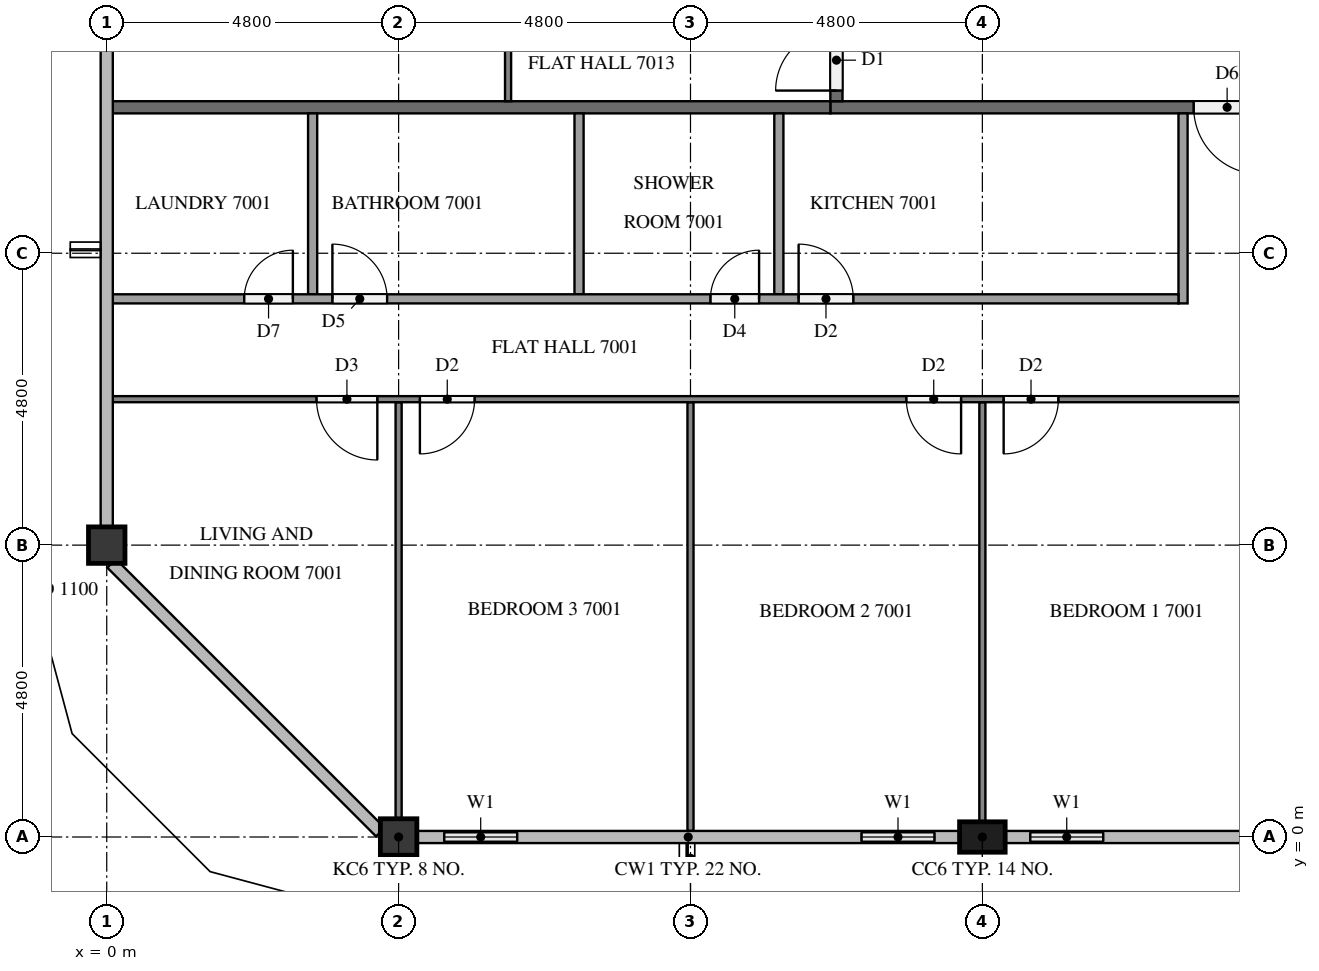
"""IFC4 building model, lengths in metres.
Left out: names, types, materials, properties, quantities, classifications, styles, units other than length and angle.
Written with IfcOpenShell. Run it as: python <this file> out.ifc"""

import sys

from ifc_helpers import new_model, si_unit, direction, frame, frame_2d, origin, origin_2d, place, context, subcontext, project, spatial, rectangle, extrude, element, fill, save


model = new_model("IFC4")
c1 = context("Model", 3, precision=1e-05, world=origin(), true_north=direction((0.0, 1.0)))
c2 = subcontext(c1, "Body", "Model", "MODEL_VIEW")
j1 = project(units=[si_unit("LENGTHUNIT", "METRE"), si_unit("PLANEANGLEUNIT", "RADIAN")], contexts=[c1])
p1 = place(None, origin())
s1 = spatial("IfcSite", under=j1, at=p1, CompositionType="ELEMENT")
p2 = place(p1, origin())
s2 = spatial("IfcBuilding", under=s1, at=p2, CompositionType="ELEMENT")
p3 = place(p2, frame((0.0, 0.0, 268.6)))
s3 = spatial("IfcBuildingStorey", under=s2, at=p3, CompositionType="ELEMENT", Elevation=268.6)
p4 = place(p3, frame((4.8, 0.0, 0.0), z_axis=(0.0, 0.0, 1.0), x_axis=(1.0, 0.0, 0.0)))
e1 = element("IfcColumn", 1, at=p4, inside=s3, PredefinedType="COLUMN", context=c2, shape_type="SweptSolid", body=[
    extrude(rectangle(XDim=0.6, YDim=0.6, at=origin_2d()), origin(), (0.0, 0.0, 1.0), 3.2),
])
p5 = place(p3, frame((14.4, 0.0, 0.0), z_axis=(0.0, 0.0, 1.0), x_axis=(1.0, 0.0, 0.0)))
e2 = element("IfcColumn", 2, at=p5, inside=s3, PredefinedType="COLUMN", context=c2, shape_type="SweptSolid", body=[
    extrude(rectangle(XDim=0.75, YDim=0.5, at=origin_2d()), origin(), (0.0, 0.0, 1.0), 3.2),
])
p6 = place(p3, frame((0.0, 4.8, 0.0), z_axis=(0.0, 0.0, 1.0), x_axis=(1.0, 0.0, 0.0)))
e3 = element("IfcColumn", 3, at=p6, inside=s3, PredefinedType="COLUMN", context=c2, shape_type="SweptSolid", body=[
    extrude(rectangle(XDim=0.6, YDim=0.6, at=origin_2d()), origin(), (0.0, 0.0, 1.0), 3.2),
])
p7 = place(p3, frame((5.1, 0.0, 0.0), z_axis=(0.0, 0.0, 1.0), x_axis=(1.0, 0.0, 0.0)))
e4 = element("IfcWall", 4, at=p7, inside=s3, PredefinedType="SOLIDWALL", context=c2, shape_type="SweptSolid", body=[
    extrude(rectangle(XDim=2.1, YDim=0.15, at=frame_2d((1.05, 0.0))), origin(), (0.0, 0.0, 1.0), 3.2),
])
p8 = place(p7, frame((0.45, 0.0, 0.9)))
e5 = element("IfcOpeningElement", 5, at=p8, cuts=e4, PredefinedType="OPENING", context=c2, shape_type="SweptSolid", body=[
    extrude(rectangle(XDim=1.2, YDim=1.4, at=frame_2d((0.6, 0.7))), frame((0.0, 0.085, 0.0), z_axis=(0.0, -1.0, 0.0), x_axis=(1.0, 0.0, 0.0)), (0.0, 0.0, 1.0), 0.17),
])
p9 = place(p3, frame((12.0, 0.0, 0.0), z_axis=(0.0, 0.0, 1.0), x_axis=(1.0, 0.0, 0.0)))
e6 = element("IfcWall", 6, at=p9, inside=s3, PredefinedType="SOLIDWALL", context=c2, shape_type="SweptSolid", body=[
    extrude(rectangle(XDim=2.025, YDim=0.15, at=frame_2d((1.012, 0.0))), origin(), (0.0, 0.0, 1.0), 3.2),
])
p10 = place(p9, frame((0.413, 0.0, 0.9)))
e7 = element("IfcOpeningElement", 7, at=p10, cuts=e6, PredefinedType="OPENING", context=c2, shape_type="SweptSolid", body=[
    extrude(rectangle(XDim=1.2, YDim=1.4, at=frame_2d((0.6, 0.7))), frame((0.0, 0.085, 0.0), z_axis=(0.0, -1.0, 0.0), x_axis=(1.0, 0.0, 0.0)), (0.0, 0.0, 1.0), 0.17),
])
p11 = place(p3, frame((14.775, 0.0, 0.0), z_axis=(0.0, 0.0, 1.0), x_axis=(1.0, 0.0, 0.0)))
e8 = element("IfcWall", 8, at=p11, inside=s3, PredefinedType="SOLIDWALL", context=c2, shape_type="SweptSolid", body=[
    extrude(rectangle(XDim=2.025, YDim=0.15, at=frame_2d((1.013, 0.0))), origin(), (0.0, 0.0, 1.0), 3.2),
])
p12 = place(p11, frame((0.413, 0.0, 0.9)))
e9 = element("IfcOpeningElement", 9, at=p12, cuts=e8, PredefinedType="OPENING", context=c2, shape_type="SweptSolid", body=[
    extrude(rectangle(XDim=1.2, YDim=1.4, at=frame_2d((0.6, 0.7))), frame((0.0, 0.085, 0.0), z_axis=(0.0, -1.0, 0.0), x_axis=(1.0, 0.0, 0.0)), (0.0, 0.0, 1.0), 0.17),
])
p13 = place(p3, frame((50.5, 12.0, 0.0), z_axis=(0.0, 0.0, 1.0), x_axis=(-1.0, 0.0, 0.0)))
e10 = element("IfcWall", 10, at=p13, inside=s3, PredefinedType="PARTITIONING", context=c2, shape_type="SweptSolid", body=[
    extrude(rectangle(XDim=38.6, YDim=0.2, at=frame_2d((19.3, 0.0))), origin(), (0.0, 0.0, 1.0), 3.2),
])
p14 = place(p13, frame((31.525, 0.0, 0.0)))
e11 = element("IfcOpeningElement", 11, at=p14, cuts=e10, PredefinedType="OPENING", context=c2, shape_type="SweptSolid", body=[
    extrude(rectangle(XDim=1.1, YDim=2.1, at=frame_2d((0.55, 1.05))), frame((0.0, 0.11, 0.0), z_axis=(0.0, -1.0, 0.0), x_axis=(1.0, 0.0, 0.0)), (0.0, 0.0, 1.0), 0.22),
])
p15 = place(p13, frame((19.575, 0.0, 0.0)))
e12 = element("IfcOpeningElement", 12, at=p15, cuts=e10, PredefinedType="OPENING", context=c2, shape_type="SweptSolid", body=[
    extrude(rectangle(XDim=1.0, YDim=2.1, at=frame_2d((0.5, 1.05))), frame((0.0, 0.11, 0.0), z_axis=(0.0, -1.0, 0.0), x_axis=(1.0, 0.0, 0.0)), (0.0, 0.0, 1.0), 0.22),
])
p16 = place(p13, frame((18.025, 0.0, 0.0)))
e13 = element("IfcOpeningElement", 13, at=p16, cuts=e10, PredefinedType="OPENING", context=c2, shape_type="SweptSolid", body=[
    extrude(rectangle(XDim=1.0, YDim=2.1, at=frame_2d((0.5, 1.05))), frame((0.0, 0.11, 0.0), z_axis=(0.0, -1.0, 0.0), x_axis=(1.0, 0.0, 0.0)), (0.0, 0.0, 1.0), 0.22),
])
p17 = place(p13, frame((1.225, 0.0, 0.0)))
e14 = element("IfcOpeningElement", 14, at=p17, cuts=e10, PredefinedType="OPENING", context=c2, shape_type="SweptSolid", body=[
    extrude(rectangle(XDim=1.0, YDim=2.1, at=frame_2d((0.5, 1.05))), frame((0.0, 0.11, 0.0), z_axis=(0.0, -1.0, 0.0), x_axis=(1.0, 0.0, 0.0)), (0.0, 0.0, 1.0), 0.22),
])
p18 = place(p3, frame((12.0, 12.1, 0.0), z_axis=(0.0, 0.0, 1.0), x_axis=(0.0, 1.0, 0.0)))
e15 = element("IfcWall", 15, at=p18, inside=s3, PredefinedType="PARTITIONING", context=c2, shape_type="SweptSolid", body=[
    extrude(rectangle(XDim=28.6, YDim=0.2, at=frame_2d((14.3, 0.0))), origin(), (0.0, 0.0, 1.0), 3.2),
])
p19 = place(p18, frame((24.175, 0.0, 0.0)))
e16 = element("IfcOpeningElement", 16, at=p19, cuts=e15, PredefinedType="OPENING", context=c2, shape_type="SweptSolid", body=[
    extrude(rectangle(XDim=1.0, YDim=2.1, at=frame_2d((0.5, 1.05))), frame((0.0, 0.11, 0.0), z_axis=(0.0, -1.0, 0.0), x_axis=(1.0, 0.0, 0.0)), (0.0, 0.0, 1.0), 0.22),
])
p20 = place(p18, frame((14.575, 0.0, 0.0)))
e17 = element("IfcOpeningElement", 17, at=p20, cuts=e15, PredefinedType="OPENING", context=c2, shape_type="SweptSolid", body=[
    extrude(rectangle(XDim=1.0, YDim=2.1, at=frame_2d((0.5, 1.05))), frame((0.0, 0.11, 0.0), z_axis=(0.0, -1.0, 0.0), x_axis=(1.0, 0.0, 0.0)), (0.0, 0.0, 1.0), 0.22),
])
p21 = place(p18, frame((0.175, 0.0, 0.0)))
e18 = element("IfcOpeningElement", 18, at=p21, cuts=e15, PredefinedType="OPENING", context=c2, shape_type="SweptSolid", body=[
    extrude(rectangle(XDim=1.0, YDim=2.1, at=frame_2d((0.5, 1.05))), frame((0.0, 0.11, 0.0), z_axis=(0.0, -1.0, 0.0), x_axis=(1.0, 0.0, 0.0)), (0.0, 0.0, 1.0), 0.22),
])
p22 = place(p3, frame((0.1, 12.0, 0.0), z_axis=(0.0, 0.0, 1.0), x_axis=(1.0, 0.0, 0.0)))
e19 = element("IfcWall", 19, at=p22, inside=s3, PredefinedType="PARTITIONING", context=c2, shape_type="SweptSolid", body=[
    extrude(rectangle(XDim=11.8, YDim=0.2, at=frame_2d((5.9, 0.0))), origin(), (0.0, 0.0, 1.0), 3.2),
])
p23 = place(p3, frame((14.4, 7.15, 0.0), z_axis=(0.0, 0.0, 1.0), x_axis=(0.0, -1.0, 0.0)))
e20 = element("IfcWall", 20, at=p23, inside=s3, PredefinedType="PARTITIONING", context=c2, shape_type="SweptSolid", body=[
    extrude(rectangle(XDim=6.9, YDim=0.1, at=frame_2d((3.45, 0.0))), origin(), (0.0, 0.0, 1.0), 3.2),
])
p24 = place(p3, frame((9.6, 7.15, 0.0), z_axis=(0.0, 0.0, 1.0), x_axis=(0.0, -1.0, 0.0)))
e21 = element("IfcWall", 21, at=p24, inside=s3, PredefinedType="PARTITIONING", context=c2, shape_type="SweptSolid", body=[
    extrude(rectangle(XDim=7.05, YDim=0.1, at=frame_2d((3.525, 0.0))), origin(), (0.0, 0.0, 1.0), 3.2),
])
p25 = place(p3, frame((4.8, 7.15, 0.0), z_axis=(0.0, 0.0, 1.0), x_axis=(0.0, -1.0, 0.0)))
e22 = element("IfcWall", 22, at=p25, inside=s3, PredefinedType="PARTITIONING", context=c2, shape_type="SweptSolid", body=[
    extrude(rectangle(XDim=6.85, YDim=0.1, at=frame_2d((3.425, 0.0))), origin(), (0.0, 0.0, 1.0), 3.2),
])
p26 = place(p3, frame((19.1, 7.2, 0.0), z_axis=(0.0, 0.0, 1.0), x_axis=(-1.0, 0.0, 0.0)))
e23 = element("IfcWall", 23, at=p26, inside=s3, PredefinedType="PARTITIONING", context=c2, shape_type="SweptSolid", body=[
    extrude(rectangle(XDim=19.0, YDim=0.1, at=frame_2d((9.5, 0.0))), origin(), (0.0, 0.0, 1.0), 3.2),
])
p27 = place(p26, frame((3.45, 0.0, 0.0)))
e24 = element("IfcOpeningElement", 24, at=p27, cuts=e23, PredefinedType="OPENING", context=c2, shape_type="SweptSolid", body=[
    extrude(rectangle(XDim=0.9, YDim=2.1, at=frame_2d((0.45, 1.05))), frame((0.0, 0.06, 0.0), z_axis=(0.0, -1.0, 0.0), x_axis=(1.0, 0.0, 0.0)), (0.0, 0.0, 1.0), 0.12),
])
p28 = place(p26, frame((5.05, 0.0, 0.0)))
e25 = element("IfcOpeningElement", 25, at=p28, cuts=e23, PredefinedType="OPENING", context=c2, shape_type="SweptSolid", body=[
    extrude(rectangle(XDim=0.9, YDim=2.1, at=frame_2d((0.45, 1.05))), frame((0.0, 0.06, 0.0), z_axis=(0.0, -1.0, 0.0), x_axis=(1.0, 0.0, 0.0)), (0.0, 0.0, 1.0), 0.12),
])
p29 = place(p26, frame((13.05, 0.0, 0.0)))
e26 = element("IfcOpeningElement", 26, at=p29, cuts=e23, PredefinedType="OPENING", context=c2, shape_type="SweptSolid", body=[
    extrude(rectangle(XDim=0.9, YDim=2.1, at=frame_2d((0.45, 1.05))), frame((0.0, 0.06, 0.0), z_axis=(0.0, -1.0, 0.0), x_axis=(1.0, 0.0, 0.0)), (0.0, 0.0, 1.0), 0.12),
])
p30 = place(p26, frame((14.65, 0.0, 0.0)))
e27 = element("IfcOpeningElement", 27, at=p30, cuts=e23, PredefinedType="OPENING", context=c2, shape_type="SweptSolid", body=[
    extrude(rectangle(XDim=1.0, YDim=2.1, at=frame_2d((0.5, 1.05))), frame((0.0, 0.06, 0.0), z_axis=(0.0, -1.0, 0.0), x_axis=(1.0, 0.0, 0.0)), (0.0, 0.0, 1.0), 0.12),
])
for number, where, z_axis, x_axis in (
    (28, (11.053, 11.9, 0.0), (0.0, 0.0, 1.0), (0.0, -1.0, 0.0)),
    (29, (7.767, 11.9, 0.0), (0.0, 0.0, 1.0), (0.0, -1.0, 0.0)),
    (30, (3.386, 11.9, 0.0), (0.0, 0.0, 1.0), (0.0, -1.0, 0.0)),
):
    element("IfcWall", number, at=place(p3, frame(where, z_axis=z_axis, x_axis=x_axis)), inside=s3, PredefinedType="PARTITIONING", context=c2, shape_type="SweptSolid", body=[
        extrude(rectangle(XDim=2.975, YDim=0.15, at=frame_2d((1.487, 0.0))), origin(), (0.0, 0.0, 1.0), 3.2),
    ])
p31 = place(p3, frame((17.7, 11.9, 0.0), z_axis=(0.0, 0.0, 1.0), x_axis=(0.0, -1.0, 0.0)))
e31 = element("IfcWall", 31, at=p31, inside=s3, PredefinedType="PARTITIONING", context=c2, shape_type="SweptSolid", body=[
    extrude(rectangle(XDim=3.125, YDim=0.15, at=frame_2d((1.562, 0.0))), origin(), (0.0, 0.0, 1.0), 3.2),
])
p32 = place(p3, frame((0.1, 8.85, 0.0), z_axis=(0.0, 0.0, 1.0), x_axis=(1.0, 0.0, 0.0)))
e32 = element("IfcWall", 32, at=p32, inside=s3, PredefinedType="PARTITIONING", context=c2, shape_type="SweptSolid", body=[
    extrude(rectangle(XDim=17.525, YDim=0.15, at=frame_2d((8.762, 0.0))), origin(), (0.0, 0.0, 1.0), 3.2),
])
p33 = place(p32, frame((11.278, 0.0, 0.0)))
e33 = element("IfcOpeningElement", 33, at=p33, cuts=e32, PredefinedType="OPENING", context=c2, shape_type="SweptSolid", body=[
    extrude(rectangle(XDim=0.9, YDim=2.1, at=frame_2d((0.45, 1.05))), frame((0.0, 0.085, 0.0), z_axis=(0.0, -1.0, 0.0), x_axis=(1.0, 0.0, 0.0)), (0.0, 0.0, 1.0), 0.17),
])
p34 = place(p32, frame((9.828, 0.0, 0.0)))
e34 = element("IfcOpeningElement", 34, at=p34, cuts=e32, PredefinedType="OPENING", context=c2, shape_type="SweptSolid", body=[
    extrude(rectangle(XDim=0.8, YDim=2.1, at=frame_2d((0.4, 1.05))), frame((0.0, 0.085, 0.0), z_axis=(0.0, -1.0, 0.0), x_axis=(1.0, 0.0, 0.0)), (0.0, 0.0, 1.0), 0.17),
])
p35 = place(p32, frame((3.611, 0.0, 0.0)))
e35 = element("IfcOpeningElement", 35, at=p35, cuts=e32, PredefinedType="OPENING", context=c2, shape_type="SweptSolid", body=[
    extrude(rectangle(XDim=0.9, YDim=2.1, at=frame_2d((0.45, 1.05))), frame((0.0, 0.085, 0.0), z_axis=(0.0, -1.0, 0.0), x_axis=(1.0, 0.0, 0.0)), (0.0, 0.0, 1.0), 0.17),
])
p36 = place(p32, frame((2.161, 0.0, 0.0)))
e36 = element("IfcOpeningElement", 36, at=p36, cuts=e32, PredefinedType="OPENING", context=c2, shape_type="SweptSolid", body=[
    extrude(rectangle(XDim=0.8, YDim=2.1, at=frame_2d((0.4, 1.05))), frame((0.0, 0.085, 0.0), z_axis=(0.0, -1.0, 0.0), x_axis=(1.0, 0.0, 0.0)), (0.0, 0.0, 1.0), 0.17),
])
p37 = place(p3, frame((6.6, 12.1, 0.0), z_axis=(0.0, 0.0, 1.0), x_axis=(0.0, 1.0, 0.0)))
e37 = element("IfcWall", 37, at=p37, inside=s3, PredefinedType="PARTITIONING", context=c2, shape_type="SweptSolid", body=[
    extrude(rectangle(XDim=14.2, YDim=0.1, at=frame_2d((7.1, 0.0))), origin(), (0.0, 0.0, 1.0), 3.2),
])
p38 = place(p37, frame((3.35, 0.0, 0.0)))
e38 = element("IfcOpeningElement", 38, at=p38, cuts=e37, PredefinedType="OPENING", context=c2, shape_type="SweptSolid", body=[
    extrude(rectangle(XDim=1.0, YDim=2.1, at=frame_2d((0.5, 1.05))), frame((0.0, 0.06, 0.0), z_axis=(0.0, -1.0, 0.0), x_axis=(1.0, 0.0, 0.0)), (0.0, 0.0, 1.0), 0.12),
])
p39 = place(p37, frame((5.05, 0.0, 0.0)))
e39 = element("IfcOpeningElement", 39, at=p39, cuts=e37, PredefinedType="OPENING", context=c2, shape_type="SweptSolid", body=[
    extrude(rectangle(XDim=0.9, YDim=2.1, at=frame_2d((0.45, 1.05))), frame((0.0, 0.06, 0.0), z_axis=(0.0, -1.0, 0.0), x_axis=(1.0, 0.0, 0.0)), (0.0, 0.0, 1.0), 0.12),
])
p40 = place(p37, frame((13.0, 0.0, 0.0)))
e40 = element("IfcOpeningElement", 40, at=p40, cuts=e37, PredefinedType="OPENING", context=c2, shape_type="SweptSolid", body=[
    extrude(rectangle(XDim=0.9, YDim=2.1, at=frame_2d((0.45, 1.05))), frame((0.0, 0.06, 0.0), z_axis=(0.0, -1.0, 0.0), x_axis=(1.0, 0.0, 0.0)), (0.0, 0.0, 1.0), 0.12),
])
p41 = place(p8, origin())
e41 = element("IfcWindow", 41, at=p41, inside=s3, PartitioningType="SINGLE_PANEL", PredefinedType="WINDOW", context=c2, shape_type="SweptSolid", body=[
    extrude(rectangle(XDim=1.2, YDim=1.4, at=frame_2d((0.6, 0.7))), frame((0.0, 0.03, 0.0), z_axis=(0.0, -1.0, 0.0), x_axis=(1.0, 0.0, 0.0)), (0.0, 0.0, 1.0), 0.06),
])
fill(e5, e41)
p42 = place(p10, origin())
e42 = element("IfcWindow", 42, at=p42, inside=s3, PartitioningType="SINGLE_PANEL", PredefinedType="WINDOW", context=c2, shape_type="SweptSolid", body=[
    extrude(rectangle(XDim=1.2, YDim=1.4, at=frame_2d((0.6, 0.7))), frame((0.0, 0.03, 0.0), z_axis=(0.0, -1.0, 0.0), x_axis=(1.0, 0.0, 0.0)), (0.0, 0.0, 1.0), 0.06),
])
fill(e7, e42)
p43 = place(p12, origin())
e43 = element("IfcWindow", 43, at=p43, inside=s3, PartitioningType="SINGLE_PANEL", PredefinedType="WINDOW", context=c2, shape_type="SweptSolid", body=[
    extrude(rectangle(XDim=1.2, YDim=1.4, at=frame_2d((0.6, 0.7))), frame((0.0, 0.03, 0.0), z_axis=(0.0, -1.0, 0.0), x_axis=(1.0, 0.0, 0.0)), (0.0, 0.0, 1.0), 0.06),
])
fill(e9, e43)
p44 = place(p14, origin())
e44 = element("IfcDoor", 44, at=p44, inside=s3, OperationType="SINGLE_SWING_LEFT", PredefinedType="DOOR", context=c2, shape_type="SweptSolid", body=[
    extrude(rectangle(XDim=1.1, YDim=2.1, at=frame_2d((0.55, 1.05))), frame((0.0, 0.025, 0.0), z_axis=(0.0, -1.0, 0.0), x_axis=(1.0, 0.0, 0.0)), (0.0, 0.0, 1.0), 0.05),
])
fill(e11, e44)
p45 = place(p21, origin())
e45 = element("IfcDoor", 45, at=p45, inside=s3, OperationType="SINGLE_SWING_LEFT", PredefinedType="DOOR", context=c2, shape_type="SweptSolid", body=[
    extrude(rectangle(XDim=1.0, YDim=2.1, at=frame_2d((0.5, 1.05))), frame((0.0, 0.025, 0.0), z_axis=(0.0, -1.0, 0.0), x_axis=(1.0, 0.0, 0.0)), (0.0, 0.0, 1.0), 0.05),
])
fill(e18, e45)
p46 = place(p27, origin())
e46 = element("IfcDoor", 46, at=p46, inside=s3, OperationType="SINGLE_SWING_RIGHT", PredefinedType="DOOR", context=c2, shape_type="SweptSolid", body=[
    extrude(rectangle(XDim=0.9, YDim=2.1, at=frame_2d((0.45, 1.05))), frame((0.0, 0.025, 0.0), z_axis=(0.0, -1.0, 0.0), x_axis=(1.0, 0.0, 0.0)), (0.0, 0.0, 1.0), 0.05),
])
fill(e24, e46)
p47 = place(p28, origin())
e47 = element("IfcDoor", 47, at=p47, inside=s3, OperationType="SINGLE_SWING_LEFT", PredefinedType="DOOR", context=c2, shape_type="SweptSolid", body=[
    extrude(rectangle(XDim=0.9, YDim=2.1, at=frame_2d((0.45, 1.05))), frame((0.0, 0.025, 0.0), z_axis=(0.0, -1.0, 0.0), x_axis=(1.0, 0.0, 0.0)), (0.0, 0.0, 1.0), 0.05),
])
fill(e25, e47)
p48 = place(p29, origin())
e48 = element("IfcDoor", 48, at=p48, inside=s3, OperationType="SINGLE_SWING_RIGHT", PredefinedType="DOOR", context=c2, shape_type="SweptSolid", body=[
    extrude(rectangle(XDim=0.9, YDim=2.1, at=frame_2d((0.45, 1.05))), frame((0.0, 0.025, 0.0), z_axis=(0.0, -1.0, 0.0), x_axis=(1.0, 0.0, 0.0)), (0.0, 0.0, 1.0), 0.05),
])
fill(e26, e48)
p49 = place(p30, origin())
e49 = element("IfcDoor", 49, at=p49, inside=s3, OperationType="SINGLE_SWING_LEFT", PredefinedType="DOOR", context=c2, shape_type="SweptSolid", body=[
    extrude(rectangle(XDim=1.0, YDim=2.1, at=frame_2d((0.5, 1.05))), frame((0.0, 0.025, 0.0), z_axis=(0.0, -1.0, 0.0), x_axis=(1.0, 0.0, 0.0)), (0.0, 0.0, 1.0), 0.05),
])
fill(e27, e49)
p50 = place(p33, origin())
e50 = element("IfcDoor", 50, at=p50, inside=s3, OperationType="SINGLE_SWING_LEFT", PredefinedType="DOOR", context=c2, shape_type="SweptSolid", body=[
    extrude(rectangle(XDim=0.9, YDim=2.1, at=frame_2d((0.45, 1.05))), frame((0.0, 0.025, 0.0), z_axis=(0.0, -1.0, 0.0), x_axis=(1.0, 0.0, 0.0)), (0.0, 0.0, 1.0), 0.05),
])
fill(e33, e50)
p51 = place(p34, origin())
e51 = element("IfcDoor", 51, at=p51, inside=s3, OperationType="SINGLE_SWING_RIGHT", PredefinedType="DOOR", context=c2, shape_type="SweptSolid", body=[
    extrude(rectangle(XDim=0.8, YDim=2.1, at=frame_2d((0.4, 1.05))), frame((0.0, 0.025, 0.0), z_axis=(0.0, -1.0, 0.0), x_axis=(1.0, 0.0, 0.0)), (0.0, 0.0, 1.0), 0.05),
])
fill(e34, e51)
p52 = place(p35, origin())
e52 = element("IfcDoor", 52, at=p52, inside=s3, OperationType="SINGLE_SWING_LEFT", PredefinedType="DOOR", context=c2, shape_type="SweptSolid", body=[
    extrude(rectangle(XDim=0.9, YDim=2.1, at=frame_2d((0.45, 1.05))), frame((0.0, 0.025, 0.0), z_axis=(0.0, -1.0, 0.0), x_axis=(1.0, 0.0, 0.0)), (0.0, 0.0, 1.0), 0.05),
])
fill(e35, e52)
p53 = place(p36, origin())
e53 = element("IfcDoor", 53, at=p53, inside=s3, OperationType="SINGLE_SWING_RIGHT", PredefinedType="DOOR", context=c2, shape_type="SweptSolid", body=[
    extrude(rectangle(XDim=0.8, YDim=2.1, at=frame_2d((0.4, 1.05))), frame((0.0, 0.025, 0.0), z_axis=(0.0, -1.0, 0.0), x_axis=(1.0, 0.0, 0.0)), (0.0, 0.0, 1.0), 0.05),
])
fill(e36, e53)
save(model, sys.argv[1])
